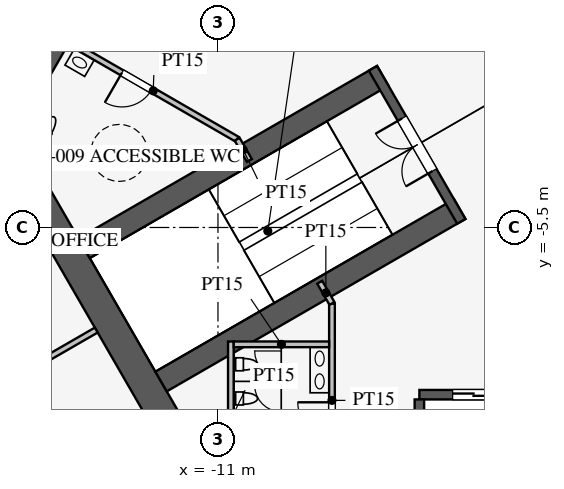
"""IFC4 building model, lengths in metres.
Left out: names, types, materials, properties, quantities, classifications, styles, units other than length and angle.
Written with IfcOpenShell. Run it as: python <this file> out.ifc"""

import sys

from ifc_helpers import new_model, si_unit, direction, frame, frame_2d, origin, place, context, subcontext, project, spatial, rectangle, extrude, element, fill, save


model = new_model("IFC4")
c1 = context("Model", 3, precision=1e-05, world=origin(), true_north=direction((0.0, 1.0)))
c2 = subcontext(c1, "Body", "Model", "MODEL_VIEW")
j1 = project(units=[si_unit("LENGTHUNIT", "METRE"), si_unit("PLANEANGLEUNIT", "RADIAN")], contexts=[c1])
p1 = place(None, origin())
s1 = spatial("IfcSite", under=j1, at=p1, CompositionType="ELEMENT")
p2 = place(p1, origin())
s2 = spatial("IfcBuilding", under=s1, at=p2, CompositionType="ELEMENT")
p3 = place(p2, frame((0.0, 0.0, 128.3)))
s3 = spatial("IfcBuildingStorey", under=s2, at=p3, CompositionType="ELEMENT", Elevation=128.3)
p4 = place(p3, frame((-5.773, 16.0, 0.0), z_axis=(0.0, 0.0, 1.0), x_axis=(-0.500002442456, -0.866023993627, 0.0)))
e1 = element("IfcWall", 1, at=p4, inside=s3, PredefinedType="SHEAR", context=c2, shape_type="SweptSolid", body=[
    extrude(rectangle(XDim=21.939, YDim=0.8, at=frame_2d((10.97, 0.0))), origin(), (0.0, 0.0, 1.0), 4.2),
])
p5 = place(p4, frame((17.27, 0.0, 0.0)))
e2 = element("IfcOpeningElement", 2, at=p5, cuts=e1, PredefinedType="OPENING", context=c2, shape_type="SweptSolid", body=[
    extrude(rectangle(XDim=1.2, YDim=2.1, at=frame_2d((0.6, 1.05))), frame((0.0, 0.41, 0.0), z_axis=(0.0, -1.0, 0.0), x_axis=(1.0, 0.0, 0.0)), (0.0, 0.0, 1.0), 0.82),
])
p6 = place(p4, frame((3.47, 0.0, 0.0)))
e3 = element("IfcOpeningElement", 3, at=p6, cuts=e1, PredefinedType="OPENING", context=c2, shape_type="SweptSolid", body=[
    extrude(rectangle(XDim=1.2, YDim=2.1, at=frame_2d((0.6, 1.05))), frame((0.0, 0.41, 0.0), z_axis=(0.0, -1.0, 0.0), x_axis=(1.0, 0.0, 0.0)), (0.0, 0.0, 1.0), 0.82),
])
p7 = place(p3, frame((-16.743, -3.0, 0.0), z_axis=(0.0, 0.0, 1.0), x_axis=(0.499995765644, -0.866027848477, 0.0)))
e4 = element("IfcWall", 4, at=p7, inside=s3, PredefinedType="SHEAR", context=c2, shape_type="SweptSolid", body=[
    extrude(rectangle(XDim=11.547, YDim=0.8, at=frame_2d((5.773, 0.0))), origin(), (0.0, 0.0, 1.0), 4.2),
])
p8 = place(p3, frame((-5.7, -9.9, 0.0), z_axis=(0.0, 0.0, 1.0), x_axis=(1.0, 0.0, 0.0)))
e5 = element("IfcWall", 5, at=p8, inside=s3, PredefinedType="SHEAR", context=c2, shape_type="SweptSolid", body=[
    extrude(rectangle(XDim=11.4, YDim=0.25, at=frame_2d((5.7, 0.0))), origin(), (0.0, 0.0, 1.0), 4.2),
])
p9 = place(p8, frame((0.875, 0.0, 0.0)))
e6 = element("IfcOpeningElement", 6, at=p9, cuts=e5, PredefinedType="OPENING", context=c2, shape_type="SweptSolid", body=[
    extrude(rectangle(XDim=1.1, YDim=2.2, at=frame_2d((0.55, 1.1))), frame((0.0, 0.135, 0.0), z_axis=(0.0, -1.0, 0.0), x_axis=(1.0, 0.0, 0.0)), (0.0, 0.0, 1.0), 0.27),
])
p10 = place(p8, frame((3.725, 0.0, 0.0)))
e7 = element("IfcOpeningElement", 7, at=p10, cuts=e5, PredefinedType="OPENING", context=c2, shape_type="SweptSolid", body=[
    extrude(rectangle(XDim=1.1, YDim=2.2, at=frame_2d((0.55, 1.1))), frame((0.0, 0.135, 0.0), z_axis=(0.0, -1.0, 0.0), x_axis=(1.0, 0.0, 0.0)), (0.0, 0.0, 1.0), 0.27),
])
p11 = place(p8, frame((6.575, 0.0, 0.0)))
e8 = element("IfcOpeningElement", 8, at=p11, cuts=e5, PredefinedType="OPENING", context=c2, shape_type="SweptSolid", body=[
    extrude(rectangle(XDim=1.1, YDim=2.2, at=frame_2d((0.55, 1.1))), frame((0.0, 0.135, 0.0), z_axis=(0.0, -1.0, 0.0), x_axis=(1.0, 0.0, 0.0)), (0.0, 0.0, 1.0), 0.27),
])
p12 = place(p8, frame((9.425, 0.0, 0.0)))
e9 = element("IfcOpeningElement", 9, at=p12, cuts=e5, PredefinedType="OPENING", context=c2, shape_type="SweptSolid", body=[
    extrude(rectangle(XDim=1.1, YDim=2.2, at=frame_2d((0.55, 1.1))), frame((0.0, 0.135, 0.0), z_axis=(0.0, -1.0, 0.0), x_axis=(1.0, 0.0, 0.0)), (0.0, 0.0, 1.0), 0.27),
])
p13 = place(p3, frame((-5.7, -10.025, 0.0), z_axis=(0.0, 0.0, 1.0), x_axis=(0.0, -1.0, 0.0)))
e10 = element("IfcWall", 10, at=p13, inside=s3, PredefinedType="SHEAR", context=c2, shape_type="SweptSolid", body=[
    extrude(rectangle(XDim=2.575, YDim=0.25, at=frame_2d((1.288, 0.0))), origin(), (0.0, 0.0, 1.0), 4.2),
])
for number, where, z_axis, x_axis in (
    (11, (-6.663, -1.509, 0.0), (0.0, 0.0, 1.0), (-0.866, -0.5, 0.0)),
    (12, (-4.638, -5.016, 0.0), (0.0, 0.0, 1.0), (-0.866, -0.5, 0.0)),
):
    element("IfcWall", number, at=place(p3, frame(where, z_axis=z_axis, x_axis=x_axis)), inside=s3, PredefinedType="SHEAR", context=c2, shape_type="SweptSolid", body=[
        extrude(rectangle(XDim=9.075, YDim=0.6, at=frame_2d((4.538, 0.0))), origin(), (0.0, 0.0, 1.0), 4.2),
    ])
p14 = place(p3, frame((-6.922, -1.312, 0.0), z_axis=(0.0, 0.0, 1.0), x_axis=(0.499984536904, -0.866034331223, 0.0)))
e13 = element("IfcWall", 13, at=p14, inside=s3, PredefinedType="SHEAR", context=c2, shape_type="SweptSolid", body=[
    extrude(rectangle(XDim=4.65, YDim=0.25, at=frame_2d((2.325, 0.0))), origin(), (0.0, 0.0, 1.0), 4.2),
])
p15 = place(p14, frame((1.525, 0.0, 0.0)))
e14 = element("IfcOpeningElement", 14, at=p15, cuts=e13, PredefinedType="OPENING", context=c2, shape_type="SweptSolid", body=[
    extrude(rectangle(XDim=1.6, YDim=2.1, at=frame_2d((0.8, 1.05))), frame((0.0, 0.135, 0.0), z_axis=(0.0, -1.0, 0.0), x_axis=(1.0, 0.0, 0.0)), (0.0, 0.0, 1.0), 0.27),
])
p16 = place(p3, frame((-8.0, -7.5, 0.0), z_axis=(0.0, 0.0, 1.0), x_axis=(0.0, -1.0, 0.0)))
e15 = element("IfcWall", 15, at=p16, inside=s3, PredefinedType="PARTITIONING", context=c2, shape_type="SweptSolid", body=[
    extrude(rectangle(XDim=5.1, YDim=0.15, at=frame_2d((2.55, 0.0))), origin(), (0.0, 0.0, 1.0), 4.0),
])
p17 = place(p16, frame((2.6, 0.0, 0.0)))
e16 = element("IfcOpeningElement", 16, at=p17, cuts=e15, PredefinedType="OPENING", context=c2, shape_type="SweptSolid", body=[
    extrude(rectangle(XDim=0.9, YDim=2.1, at=frame_2d((0.45, 1.05))), frame((0.0, 0.085, 0.0), z_axis=(0.0, -1.0, 0.0), x_axis=(1.0, 0.0, 0.0)), (0.0, 0.0, 1.0), 0.17),
])
p18 = place(p3, frame((-10.495, -3.178, 0.0), z_axis=(0.0, 0.0, 1.0), x_axis=(-0.86602216432, 0.500005610874, 0.0)))
e17 = element("IfcWall", 17, at=p18, inside=s3, PredefinedType="PARTITIONING", context=c2, shape_type="SweptSolid", body=[
    extrude(rectangle(XDim=5.1, YDim=0.15, at=frame_2d((2.55, 0.0))), origin(), (0.0, 0.0, 1.0), 4.0),
])
p19 = place(p18, frame((2.6, 0.0, 0.0)))
e18 = element("IfcOpeningElement", 18, at=p19, cuts=e17, PredefinedType="OPENING", context=c2, shape_type="SweptSolid", body=[
    extrude(rectangle(XDim=0.9, YDim=2.1, at=frame_2d((0.45, 1.05))), frame((0.0, 0.085, 0.0), z_axis=(0.0, -1.0, 0.0), x_axis=(1.0, 0.0, 0.0)), (0.0, 0.0, 1.0), 0.17),
])
for number, where, z_axis, x_axis in (
    (19, (-10.495, -3.178, 0.0), (0.0, 0.0, 1.0), (0.5, -0.866, 0.0)),
    (20, (-8.0, -7.5, 0.0), (0.0, 0.0, 1.0), (-0.5, 0.866, 0.0)),
):
    element("IfcWall", number, at=place(p3, frame(where, z_axis=z_axis, x_axis=x_axis)), inside=s3, PredefinedType="PARTITIONING", context=c2, shape_type="SweptSolid", body=[
        extrude(rectangle(XDim=0.645, YDim=0.15, at=frame_2d((0.323, 0.0))), origin(), (0.0, 0.0, 1.0), 4.0),
    ])
p20 = place(p3, frame((-10.66, -8.5, 0.0), z_axis=(0.0, 0.0, 1.0), x_axis=(0.0, -1.0, 0.0)))
e21 = element("IfcWall", 21, at=p20, inside=s3, PredefinedType="PARTITIONING", context=c2, shape_type="SweptSolid", body=[
    extrude(rectangle(XDim=4.1, YDim=0.15, at=frame_2d((2.05, 0.0))), origin(), (0.0, 0.0, 1.0), 4.0),
])
p21 = place(p3, frame((-8.075, -8.575, 0.0), z_axis=(0.0, 0.0, 1.0), x_axis=(-1.0, 0.0, 0.0)))
e22 = element("IfcWall", 22, at=p21, inside=s3, PredefinedType="PARTITIONING", context=c2, shape_type="SweptSolid", body=[
    extrude(rectangle(XDim=2.51, YDim=0.15, at=frame_2d((1.255, 0.0))), origin(), (0.0, 0.0, 1.0), 4.0),
])
p22 = place(p3, frame((-14.203, -8.2, 0.0), z_axis=(0.0, 0.0, 1.0), x_axis=(-0.866024668836, -0.500001272966, 0.0)))
e23 = element("IfcWall", 23, at=p22, inside=s3, PredefinedType="PARTITIONING", context=c2, shape_type="SweptSolid", body=[
    extrude(rectangle(XDim=16.65, YDim=0.15, at=frame_2d((8.325, 0.0))), origin(), (0.0, 0.0, 1.0), 2.3),
])
p23 = place(p3, frame((-0.016, 30.491, 0.0), z_axis=(0.0, 0.0, 1.0), x_axis=(-0.50000091641, -0.866024874695, 0.0)))
e24 = element("IfcWall", 24, at=p23, inside=s3, PredefinedType="PARTITIONING", context=c2, shape_type="SweptSolid", body=[
    extrude(rectangle(XDim=52.796, YDim=0.12, at=frame_2d((26.398, 0.0))), origin(), (0.0, 0.0, 1.0), 2.9),
])
p24 = place(p23, frame((10.2, 0.0, 0.15)))
e25 = element("IfcOpeningElement", 25, at=p24, cuts=e24, PredefinedType="OPENING", context=c2, shape_type="SweptSolid", body=[
    extrude(rectangle(XDim=1.8, YDim=2.1, at=frame_2d((0.9, 1.05))), frame((0.0, 0.07, 0.0), z_axis=(0.0, -1.0, 0.0), x_axis=(1.0, 0.0, 0.0)), (0.0, 0.0, 1.0), 0.14),
])
p25 = place(p23, frame((40.8, 0.0, 0.15)))
e26 = element("IfcOpeningElement", 26, at=p25, cuts=e24, PredefinedType="OPENING", context=c2, shape_type="SweptSolid", body=[
    extrude(rectangle(XDim=1.8, YDim=2.1, at=frame_2d((0.9, 1.05))), frame((0.0, 0.07, 0.0), z_axis=(0.0, -1.0, 0.0), x_axis=(1.0, 0.0, 0.0)), (0.0, 0.0, 1.0), 0.14),
])
p26 = place(p17, frame((0.9, 0.0, 0.0), z_axis=(0.0, 0.0, 1.0), x_axis=(-1.0, 0.0, 0.0)))
e27 = element("IfcDoor", 27, at=p26, inside=s3, OperationType="SINGLE_SWING_RIGHT", PredefinedType="DOOR", context=c2, shape_type="SweptSolid", body=[
    extrude(rectangle(XDim=0.9, YDim=2.1, at=frame_2d((0.45, 1.05))), frame((0.0, 0.025, 0.0), z_axis=(0.0, -1.0, 0.0), x_axis=(1.0, 0.0, 0.0)), (0.0, 0.0, 1.0), 0.05),
])
fill(e16, e27)
p27 = place(p19, origin())
e28 = element("IfcDoor", 28, at=p27, inside=s3, OperationType="SINGLE_SWING_RIGHT", PredefinedType="DOOR", context=c2, shape_type="SweptSolid", body=[
    extrude(rectangle(XDim=0.9, YDim=2.1, at=frame_2d((0.45, 1.05))), frame((0.0, 0.025, 0.0), z_axis=(0.0, -1.0, 0.0), x_axis=(1.0, 0.0, 0.0)), (0.0, 0.0, 1.0), 0.05),
])
fill(e18, e28)
p28 = place(p15, frame((1.6, 0.0, 0.0), z_axis=(0.0, 0.0, 1.0), x_axis=(-1.0, 0.0, 0.0)))
e29 = element("IfcDoor", 29, at=p28, inside=s3, OperationType="DOUBLE_DOOR_SINGLE_SWING", PredefinedType="DOOR", context=c2, shape_type="SweptSolid", body=[
    extrude(rectangle(XDim=1.6, YDim=2.1, at=frame_2d((0.8, 1.05))), frame((0.0, 0.025, 0.0), z_axis=(0.0, -1.0, 0.0), x_axis=(1.0, 0.0, 0.0)), (0.0, 0.0, 1.0), 0.05),
])
fill(e14, e29)
p29 = place(p9, origin())
e30 = element("IfcDoor", 30, at=p29, inside=s3, OperationType="DOUBLE_DOOR_SLIDING", PredefinedType="DOOR", context=c2, shape_type="SweptSolid", body=[
    extrude(rectangle(XDim=1.1, YDim=2.2, at=frame_2d((0.55, 1.1))), frame((0.0, 0.025, 0.0), z_axis=(0.0, -1.0, 0.0), x_axis=(1.0, 0.0, 0.0)), (0.0, 0.0, 1.0), 0.05),
])
fill(e6, e30)
save(model, sys.argv[1])
